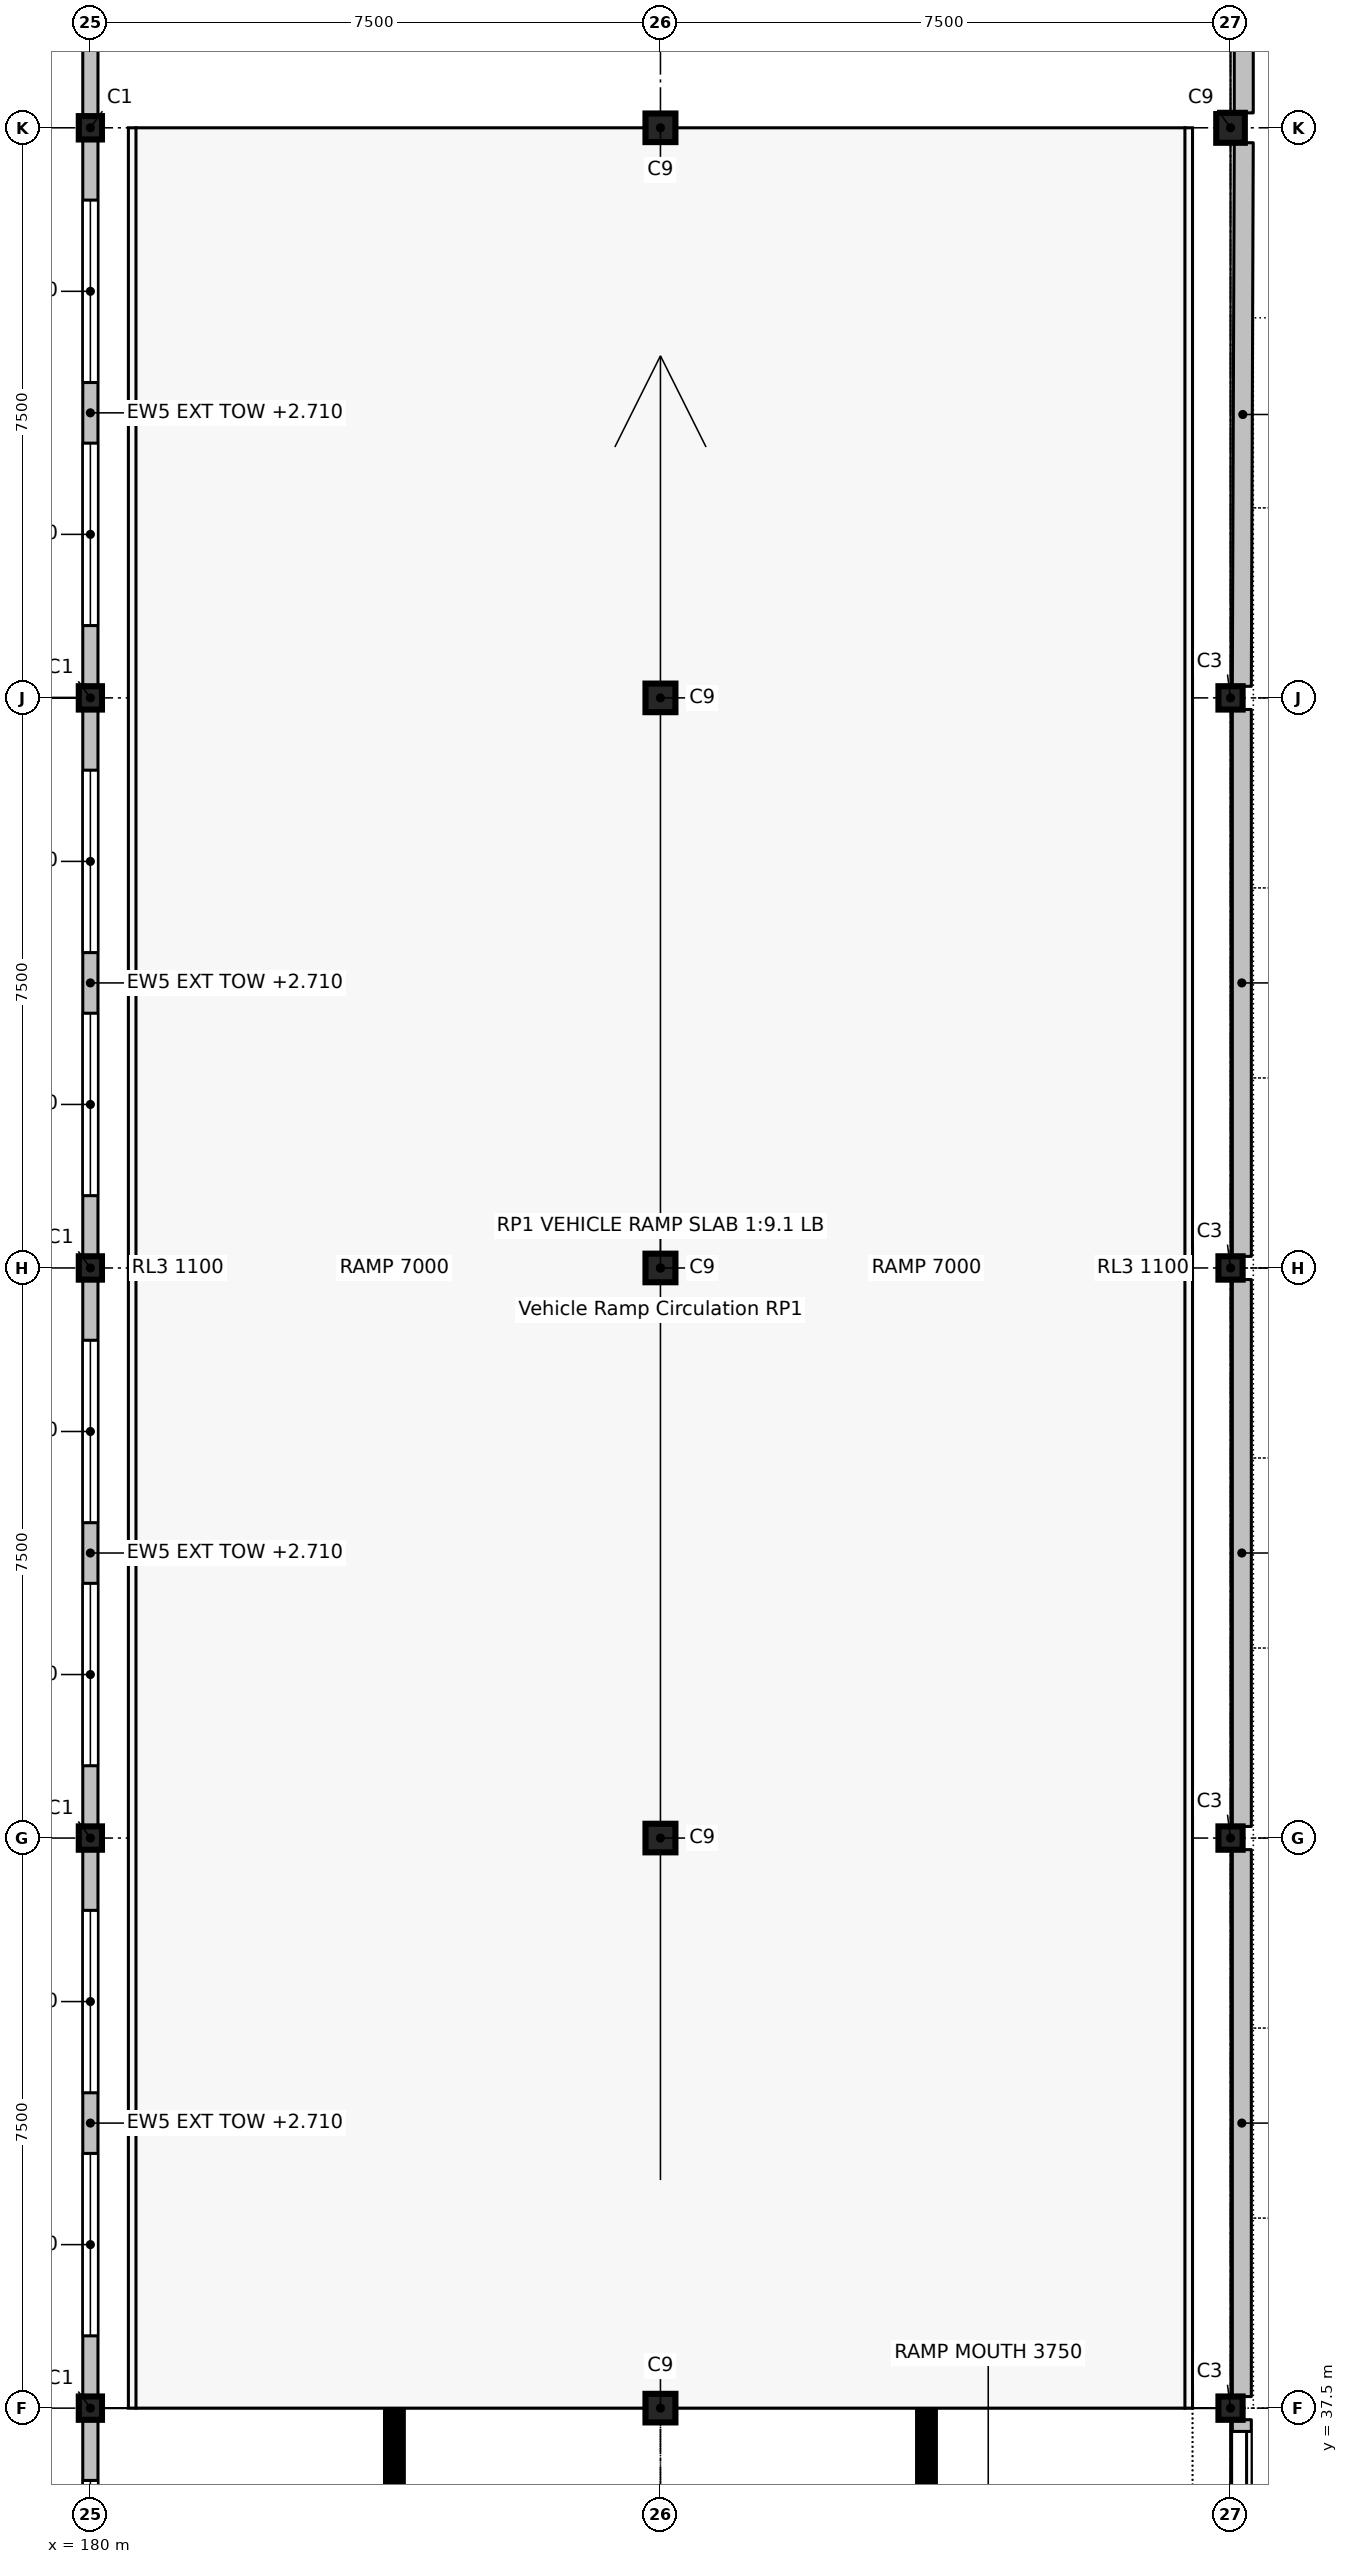
"""IFC4 building model, lengths in metres.
Left out: names, types, materials, properties, quantities, classifications, styles, units other than length and angle.
Written with IfcOpenShell. Run it as: python <this file> out.ifc"""

import sys

from ifc_helpers import new_model, si_unit, direction, frame, frame_2d, origin, origin_2d, place, context, subcontext, project, spatial, rectangle, i_section, extrude, element, fill, save


model = new_model("IFC4")
c1 = context("Model", 3, precision=1e-05, world=origin(), true_north=direction((0.0, 1.0)))
c2 = subcontext(c1, "Body", "Model", "MODEL_VIEW")
j1 = project(units=[si_unit("LENGTHUNIT", "METRE"), si_unit("PLANEANGLEUNIT", "RADIAN")], contexts=[c1])
p1 = place(None, origin())
s1 = spatial("IfcSite", under=j1, at=p1, CompositionType="ELEMENT")
p2 = place(p1, origin())
s2 = spatial("IfcBuilding", under=s1, at=p2, CompositionType="ELEMENT")
p3 = place(p2, origin())
s3 = spatial("IfcBuildingStorey", under=s2, at=p3, CompositionType="ELEMENT", Elevation=0.0)
for number, where, z_axis, x_axis in (
    (1, (180.0, 37.5, -0.25), (0.0, 0.0, 1.0), (1.0, 0.0, 0.0)),
    (2, (180.0, 45.0, -0.25), (0.0, 0.0, 1.0), (1.0, 0.0, 0.0)),
    (3, (180.0, 52.5, -0.25), (0.0, 0.0, 1.0), (1.0, 0.0, 0.0)),
    (4, (180.0, 60.0, -0.25), (0.0, 0.0, 1.0), (1.0, 0.0, 0.0)),
    (5, (180.0, 67.5, -0.25), (0.0, 0.0, 1.0), (1.0, 0.0, 0.0)),
):
    element("IfcColumn", number, at=place(p3, frame(where, z_axis=z_axis, x_axis=x_axis)), inside=s3, PredefinedType="COLUMN", context=c2, shape_type="SweptSolid", body=[
        extrude(i_section(OverallWidth=0.305, OverallDepth=0.307, WebThickness=0.01, FlangeThickness=0.015, FilletRadius=0.015, at=origin_2d()), origin(), (0.0, 0.0, 1.0), 3.55),
    ])
for number, where, z_axis, x_axis in (
    (6, (187.5, 37.5, -0.25), (0.0, 0.0, 1.0), (1.0, 0.0, 0.0)),
    (7, (187.5, 45.0, -0.25), (0.0, 0.0, 1.0), (1.0, 0.0, 0.0)),
    (8, (187.5, 52.5, -0.25), (0.0, 0.0, 1.0), (1.0, 0.0, 0.0)),
    (9, (187.5, 60.0, -0.25), (0.0, 0.0, 1.0), (1.0, 0.0, 0.0)),
    (10, (187.5, 67.5, -0.25), (0.0, 0.0, 1.0), (1.0, 0.0, 0.0)),
    (11, (195.0, 67.5, -0.25), (0.0, 0.0, 1.0), (0.0, 1.0, 0.0)),
):
    element("IfcColumn", number, at=place(p3, frame(where, z_axis=z_axis, x_axis=x_axis)), inside=s3, PredefinedType="COLUMN", context=c2, shape_type="SweptSolid", body=[
        extrude(i_section(OverallWidth=0.394, OverallDepth=0.376, WebThickness=0.017, FlangeThickness=0.028, FilletRadius=0.015, at=origin_2d()), origin(), (0.0, 0.0, 1.0), 3.55),
    ])
for number, where, z_axis, x_axis in (
    (12, (195.0, 60.0, -0.25), (0.0, 0.0, 1.0), (0.0, 1.0, 0.0)),
    (13, (195.0, 52.5, -0.25), (0.0, 0.0, 1.0), (0.0, 1.0, 0.0)),
    (14, (195.0, 45.0, -0.25), (0.0, 0.0, 1.0), (0.0, 1.0, 0.0)),
    (15, (195.0, 37.5, -0.25), (0.0, 0.0, 1.0), (0.0, 1.0, 0.0)),
):
    element("IfcColumn", number, at=place(p3, frame(where, z_axis=z_axis, x_axis=x_axis)), inside=s3, PredefinedType="COLUMN", context=c2, shape_type="SweptSolid", body=[
        extrude(i_section(OverallWidth=0.307, OverallDepth=0.318, WebThickness=0.013, FlangeThickness=0.021, FilletRadius=0.015, at=origin_2d()), origin(), (0.0, 0.0, 1.0), 3.55),
    ])
p4 = place(p3, frame((195.174, 74.995, 0.0), z_axis=(0.0, 0.0, 1.0), x_axis=(0.0, -1.0, 0.0)))
e16 = element("IfcWall", 16, at=p4, inside=s3, PredefinedType="SOLIDWALL", context=c2, shape_type="SweptSolid", body=[
    extrude(rectangle(XDim=7.299, YDim=0.25, at=frame_2d((3.649, 0.0))), origin(), (0.0, 0.0, 1.0), 1.1),
])
p5 = place(p3, frame((195.174, 67.304, 0.0), z_axis=(0.0, 0.0, 1.0), x_axis=(-0.003550435085, -0.999993697185, 0.0)))
e17 = element("IfcWall", 17, at=p5, inside=s3, PredefinedType="SOLIDWALL", context=c2, shape_type="SweptSolid", body=[
    extrude(rectangle(XDim=7.151, YDim=0.25, at=frame_2d((3.576, 0.0))), origin(), (0.0, 0.0, 1.0), 1.1),
])
for number, where, z_axis, x_axis in (
    (18, (195.149, 59.847, 0.0), (0.0, 0.0, 1.0), (0.0, -1.0, 0.0)),
    (19, (195.149, 52.347, 0.0), (0.0, 0.0, 1.0), (0.0, -1.0, 0.0)),
    (20, (195.149, 44.847, 0.0), (0.0, 0.0, 1.0), (0.0, -1.0, 0.0)),
):
    element("IfcWall", number, at=place(p3, frame(where, z_axis=z_axis, x_axis=x_axis)), inside=s3, PredefinedType="SOLIDWALL", context=c2, shape_type="SweptSolid", body=[
        extrude(rectangle(XDim=7.195, YDim=0.25, at=frame_2d((3.597, 0.0))), origin(), (0.0, 0.0, 1.0), 1.1),
    ])
p6 = place(p3, frame((195.149, 37.347, 0.0), z_axis=(0.0, 0.0, 1.0), x_axis=(0.000406476492, -0.999999917388, 0.0)))
e21 = element("IfcWall", 21, at=p6, inside=s3, PredefinedType="SOLIDWALL", context=c2, shape_type="SweptSolid", body=[
    extrude(rectangle(XDim=7.208, YDim=0.25, at=frame_2d((3.604, 0.0))), origin(), (0.0, 0.0, 1.0), 2.6),
])
p7 = place(p6, frame((0.154, 0.0, 0.0)))
e22 = element("IfcOpeningElement", 22, at=p7, cuts=e21, PredefinedType="OPENING", context=c2, shape_type="SweptSolid", body=[
    extrude(rectangle(XDim=3.3, YDim=2.5, at=frame_2d((1.65, 1.25))), frame((0.0, 0.135, 0.0), z_axis=(0.0, -1.0, 0.0), x_axis=(1.0, 0.0, 0.0)), (0.0, 0.0, 1.0), 0.27),
])
p8 = place(p6, frame((3.754, 0.0, 0.0)))
e23 = element("IfcOpeningElement", 23, at=p8, cuts=e21, PredefinedType="OPENING", context=c2, shape_type="SweptSolid", body=[
    extrude(rectangle(XDim=3.3, YDim=2.5, at=frame_2d((1.65, 1.25))), frame((0.0, 0.135, 0.0), z_axis=(0.0, -1.0, 0.0), x_axis=(1.0, 0.0, 0.0)), (0.0, 0.0, 1.0), 0.27),
])
p9 = place(p3, frame((180.0, 30.154, 0.0), z_axis=(0.0, 0.0, 1.0), x_axis=(0.0, 1.0, 0.0)))
e24 = element("IfcWall", 24, at=p9, inside=s3, PredefinedType="SOLIDWALL", context=c2, shape_type="SweptSolid", body=[
    extrude(rectangle(XDim=7.193, YDim=0.2, at=frame_2d((3.596, 0.0))), origin(), (0.0, 0.0, 1.0), 2.754),
])
p10 = place(p9, frame((0.798, 0.0, 0.9)))
e25 = element("IfcOpeningElement", 25, at=p10, cuts=e24, PredefinedType="OPENING", context=c2, shape_type="SweptSolid", body=[
    extrude(rectangle(XDim=2.4, YDim=1.5, at=frame_2d((1.2, 0.75))), frame((0.0, 0.11, 0.0), z_axis=(0.0, -1.0, 0.0), x_axis=(1.0, 0.0, 0.0)), (0.0, 0.0, 1.0), 0.22),
])
p11 = place(p9, frame((3.995, 0.0, 0.9)))
e26 = element("IfcOpeningElement", 26, at=p11, cuts=e24, PredefinedType="OPENING", context=c2, shape_type="SweptSolid", body=[
    extrude(rectangle(XDim=2.4, YDim=1.5, at=frame_2d((1.2, 0.75))), frame((0.0, 0.11, 0.0), z_axis=(0.0, -1.0, 0.0), x_axis=(1.0, 0.0, 0.0)), (0.0, 0.0, 1.0), 0.22),
])
p12 = place(p3, frame((180.0, 37.654, 0.0), z_axis=(0.0, 0.0, 1.0), x_axis=(0.0, 1.0, 0.0)))
e27 = element("IfcWall", 27, at=p12, inside=s3, PredefinedType="SOLIDWALL", context=c2, shape_type="SweptSolid", body=[
    extrude(rectangle(XDim=7.193, YDim=0.2, at=frame_2d((3.596, 0.0))), origin(), (0.0, 0.0, 1.0), 2.71),
])
p13 = place(p12, frame((0.798, 0.0, 0.9)))
e28 = element("IfcOpeningElement", 28, at=p13, cuts=e27, PredefinedType="OPENING", context=c2, shape_type="SweptSolid", body=[
    extrude(rectangle(XDim=2.4, YDim=1.5, at=frame_2d((1.2, 0.75))), frame((0.0, 0.11, 0.0), z_axis=(0.0, -1.0, 0.0), x_axis=(1.0, 0.0, 0.0)), (0.0, 0.0, 1.0), 0.22),
])
p14 = place(p12, frame((3.995, 0.0, 0.9)))
e29 = element("IfcOpeningElement", 29, at=p14, cuts=e27, PredefinedType="OPENING", context=c2, shape_type="SweptSolid", body=[
    extrude(rectangle(XDim=2.4, YDim=1.5, at=frame_2d((1.2, 0.75))), frame((0.0, 0.11, 0.0), z_axis=(0.0, -1.0, 0.0), x_axis=(1.0, 0.0, 0.0)), (0.0, 0.0, 1.0), 0.22),
])
p15 = place(p3, frame((180.0, 45.154, 0.0), z_axis=(0.0, 0.0, 1.0), x_axis=(0.0, 1.0, 0.0)))
e30 = element("IfcWall", 30, at=p15, inside=s3, PredefinedType="SOLIDWALL", context=c2, shape_type="SweptSolid", body=[
    extrude(rectangle(XDim=7.193, YDim=0.2, at=frame_2d((3.596, 0.0))), origin(), (0.0, 0.0, 1.0), 2.71),
])
p16 = place(p15, frame((0.798, 0.0, 0.9)))
e31 = element("IfcOpeningElement", 31, at=p16, cuts=e30, PredefinedType="OPENING", context=c2, shape_type="SweptSolid", body=[
    extrude(rectangle(XDim=2.4, YDim=1.5, at=frame_2d((1.2, 0.75))), frame((0.0, 0.11, 0.0), z_axis=(0.0, -1.0, 0.0), x_axis=(1.0, 0.0, 0.0)), (0.0, 0.0, 1.0), 0.22),
])
p17 = place(p15, frame((3.995, 0.0, 0.9)))
e32 = element("IfcOpeningElement", 32, at=p17, cuts=e30, PredefinedType="OPENING", context=c2, shape_type="SweptSolid", body=[
    extrude(rectangle(XDim=2.4, YDim=1.5, at=frame_2d((1.2, 0.75))), frame((0.0, 0.11, 0.0), z_axis=(0.0, -1.0, 0.0), x_axis=(1.0, 0.0, 0.0)), (0.0, 0.0, 1.0), 0.22),
])
p18 = place(p3, frame((180.0, 52.654, 0.0), z_axis=(0.0, 0.0, 1.0), x_axis=(0.0, 1.0, 0.0)))
e33 = element("IfcWall", 33, at=p18, inside=s3, PredefinedType="SOLIDWALL", context=c2, shape_type="SweptSolid", body=[
    extrude(rectangle(XDim=7.193, YDim=0.2, at=frame_2d((3.596, 0.0))), origin(), (0.0, 0.0, 1.0), 2.71),
])
p19 = place(p18, frame((0.798, 0.0, 0.9)))
e34 = element("IfcOpeningElement", 34, at=p19, cuts=e33, PredefinedType="OPENING", context=c2, shape_type="SweptSolid", body=[
    extrude(rectangle(XDim=2.4, YDim=1.5, at=frame_2d((1.2, 0.75))), frame((0.0, 0.11, 0.0), z_axis=(0.0, -1.0, 0.0), x_axis=(1.0, 0.0, 0.0)), (0.0, 0.0, 1.0), 0.22),
])
p20 = place(p18, frame((3.995, 0.0, 0.9)))
e35 = element("IfcOpeningElement", 35, at=p20, cuts=e33, PredefinedType="OPENING", context=c2, shape_type="SweptSolid", body=[
    extrude(rectangle(XDim=2.4, YDim=1.5, at=frame_2d((1.2, 0.75))), frame((0.0, 0.11, 0.0), z_axis=(0.0, -1.0, 0.0), x_axis=(1.0, 0.0, 0.0)), (0.0, 0.0, 1.0), 0.22),
])
p21 = place(p3, frame((180.0, 60.154, 0.0), z_axis=(0.0, 0.0, 1.0), x_axis=(0.0, 1.0, 0.0)))
e36 = element("IfcWall", 36, at=p21, inside=s3, PredefinedType="SOLIDWALL", context=c2, shape_type="SweptSolid", body=[
    extrude(rectangle(XDim=7.193, YDim=0.2, at=frame_2d((3.596, 0.0))), origin(), (0.0, 0.0, 1.0), 2.71),
])
p22 = place(p21, frame((0.798, 0.0, 0.9)))
e37 = element("IfcOpeningElement", 37, at=p22, cuts=e36, PredefinedType="OPENING", context=c2, shape_type="SweptSolid", body=[
    extrude(rectangle(XDim=2.4, YDim=1.5, at=frame_2d((1.2, 0.75))), frame((0.0, 0.11, 0.0), z_axis=(0.0, -1.0, 0.0), x_axis=(1.0, 0.0, 0.0)), (0.0, 0.0, 1.0), 0.22),
])
p23 = place(p21, frame((3.995, 0.0, 0.9)))
e38 = element("IfcOpeningElement", 38, at=p23, cuts=e36, PredefinedType="OPENING", context=c2, shape_type="SweptSolid", body=[
    extrude(rectangle(XDim=2.4, YDim=1.5, at=frame_2d((1.2, 0.75))), frame((0.0, 0.11, 0.0), z_axis=(0.0, -1.0, 0.0), x_axis=(1.0, 0.0, 0.0)), (0.0, 0.0, 1.0), 0.22),
])
p24 = place(p3, frame((180.0, 67.654, 0.0), z_axis=(0.0, 0.0, 1.0), x_axis=(0.0, 1.0, 0.0)))
e39 = element("IfcWall", 39, at=p24, inside=s3, PredefinedType="SOLIDWALL", context=c2, shape_type="SweptSolid", body=[
    extrude(rectangle(XDim=7.193, YDim=0.2, at=frame_2d((3.596, 0.0))), origin(), (0.0, 0.0, 1.0), 2.754),
])
p25 = place(p24, frame((1.098, 0.0, 1.1)))
e40 = element("IfcOpeningElement", 40, at=p25, cuts=e39, PredefinedType="OPENING", context=c2, shape_type="SweptSolid", body=[
    extrude(rectangle(XDim=1.8, YDim=1.4, at=frame_2d((0.9, 0.7))), frame((0.0, 0.11, 0.0), z_axis=(0.0, -1.0, 0.0), x_axis=(1.0, 0.0, 0.0)), (0.0, 0.0, 1.0), 0.22),
])
p26 = place(p24, frame((4.295, 0.0, 1.1)))
e41 = element("IfcOpeningElement", 41, at=p26, cuts=e39, PredefinedType="OPENING", context=c2, shape_type="SweptSolid", body=[
    extrude(rectangle(XDim=1.8, YDim=1.4, at=frame_2d((0.9, 0.7))), frame((0.0, 0.11, 0.0), z_axis=(0.0, -1.0, 0.0), x_axis=(1.0, 0.0, 0.0)), (0.0, 0.0, 1.0), 0.22),
])
p27 = place(p7, origin())
e42 = element("IfcDoor", 42, at=p27, inside=s3, OperationType="ROLLINGUP", PredefinedType="DOOR", context=c2, shape_type="SweptSolid", body=[
    extrude(rectangle(XDim=3.3, YDim=2.5, at=frame_2d((1.65, 1.25))), frame((0.0, 0.025, 0.0), z_axis=(0.0, -1.0, 0.0), x_axis=(1.0, 0.0, 0.0)), (0.0, 0.0, 1.0), 0.05),
])
fill(e22, e42)
p28 = place(p11, origin())
e43 = element("IfcWindow", 43, at=p28, inside=s3, PartitioningType="DOUBLE_PANEL_VERTICAL", PredefinedType="WINDOW", context=c2, shape_type="SweptSolid", body=[
    extrude(rectangle(XDim=2.4, YDim=1.5, at=frame_2d((1.2, 0.75))), frame((0.0, 0.03, 0.0), z_axis=(0.0, -1.0, 0.0), x_axis=(1.0, 0.0, 0.0)), (0.0, 0.0, 1.0), 0.06),
])
fill(e26, e43)
p29 = place(p13, origin())
e44 = element("IfcWindow", 44, at=p29, inside=s3, PartitioningType="DOUBLE_PANEL_VERTICAL", PredefinedType="WINDOW", context=c2, shape_type="SweptSolid", body=[
    extrude(rectangle(XDim=2.4, YDim=1.5, at=frame_2d((1.2, 0.75))), frame((0.0, 0.03, 0.0), z_axis=(0.0, -1.0, 0.0), x_axis=(1.0, 0.0, 0.0)), (0.0, 0.0, 1.0), 0.06),
])
fill(e28, e44)
p30 = place(p14, origin())
e45 = element("IfcWindow", 45, at=p30, inside=s3, PartitioningType="DOUBLE_PANEL_VERTICAL", PredefinedType="WINDOW", context=c2, shape_type="SweptSolid", body=[
    extrude(rectangle(XDim=2.4, YDim=1.5, at=frame_2d((1.2, 0.75))), frame((0.0, 0.03, 0.0), z_axis=(0.0, -1.0, 0.0), x_axis=(1.0, 0.0, 0.0)), (0.0, 0.0, 1.0), 0.06),
])
fill(e29, e45)
p31 = place(p16, origin())
e46 = element("IfcWindow", 46, at=p31, inside=s3, PartitioningType="DOUBLE_PANEL_VERTICAL", PredefinedType="WINDOW", context=c2, shape_type="SweptSolid", body=[
    extrude(rectangle(XDim=2.4, YDim=1.5, at=frame_2d((1.2, 0.75))), frame((0.0, 0.03, 0.0), z_axis=(0.0, -1.0, 0.0), x_axis=(1.0, 0.0, 0.0)), (0.0, 0.0, 1.0), 0.06),
])
fill(e31, e46)
p32 = place(p17, origin())
e47 = element("IfcWindow", 47, at=p32, inside=s3, PartitioningType="DOUBLE_PANEL_VERTICAL", PredefinedType="WINDOW", context=c2, shape_type="SweptSolid", body=[
    extrude(rectangle(XDim=2.4, YDim=1.5, at=frame_2d((1.2, 0.75))), frame((0.0, 0.03, 0.0), z_axis=(0.0, -1.0, 0.0), x_axis=(1.0, 0.0, 0.0)), (0.0, 0.0, 1.0), 0.06),
])
fill(e32, e47)
p33 = place(p19, origin())
e48 = element("IfcWindow", 48, at=p33, inside=s3, PartitioningType="DOUBLE_PANEL_VERTICAL", PredefinedType="WINDOW", context=c2, shape_type="SweptSolid", body=[
    extrude(rectangle(XDim=2.4, YDim=1.5, at=frame_2d((1.2, 0.75))), frame((0.0, 0.03, 0.0), z_axis=(0.0, -1.0, 0.0), x_axis=(1.0, 0.0, 0.0)), (0.0, 0.0, 1.0), 0.06),
])
fill(e34, e48)
p34 = place(p20, origin())
e49 = element("IfcWindow", 49, at=p34, inside=s3, PartitioningType="DOUBLE_PANEL_VERTICAL", PredefinedType="WINDOW", context=c2, shape_type="SweptSolid", body=[
    extrude(rectangle(XDim=2.4, YDim=1.5, at=frame_2d((1.2, 0.75))), frame((0.0, 0.03, 0.0), z_axis=(0.0, -1.0, 0.0), x_axis=(1.0, 0.0, 0.0)), (0.0, 0.0, 1.0), 0.06),
])
fill(e35, e49)
p35 = place(p22, origin())
e50 = element("IfcWindow", 50, at=p35, inside=s3, PartitioningType="DOUBLE_PANEL_VERTICAL", PredefinedType="WINDOW", context=c2, shape_type="SweptSolid", body=[
    extrude(rectangle(XDim=2.4, YDim=1.5, at=frame_2d((1.2, 0.75))), frame((0.0, 0.03, 0.0), z_axis=(0.0, -1.0, 0.0), x_axis=(1.0, 0.0, 0.0)), (0.0, 0.0, 1.0), 0.06),
])
fill(e37, e50)
p36 = place(p23, origin())
e51 = element("IfcWindow", 51, at=p36, inside=s3, PartitioningType="DOUBLE_PANEL_VERTICAL", PredefinedType="WINDOW", context=c2, shape_type="SweptSolid", body=[
    extrude(rectangle(XDim=2.4, YDim=1.5, at=frame_2d((1.2, 0.75))), frame((0.0, 0.03, 0.0), z_axis=(0.0, -1.0, 0.0), x_axis=(1.0, 0.0, 0.0)), (0.0, 0.0, 1.0), 0.06),
])
fill(e38, e51)
save(model, sys.argv[1])
